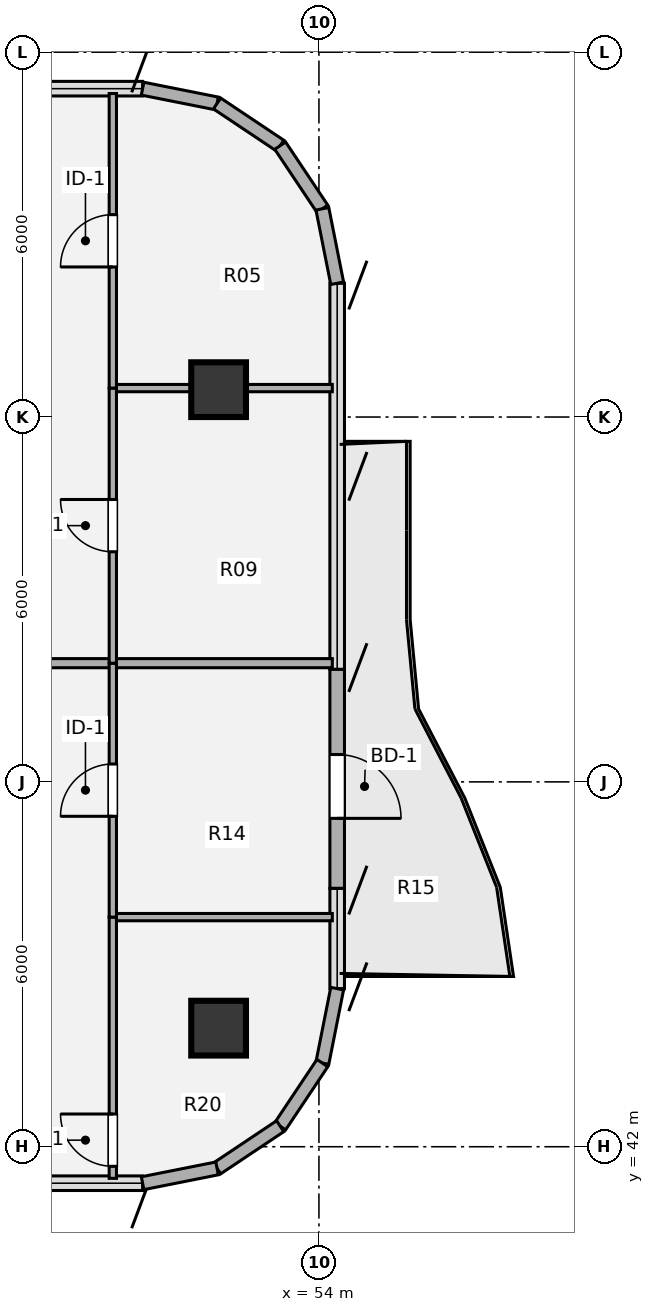
"""IFC4 building model, lengths in metres.
Left out: names, types, materials, properties, quantities, classifications, styles, units other than length and angle.
Written with IfcOpenShell. Run it as: python <this file> out.ifc"""

import sys

from ifc_helpers import new_model, si_unit, direction, frame, frame_2d, origin, origin_2d, place, context, subcontext, project, spatial, rectangle, hollow_circle, extrude, source, transform, mapped, element, fill, save


model = new_model("IFC4")
c1 = context("Model", 3, precision=1e-05, world=origin(), true_north=direction((0.0, 1.0)))
c2 = subcontext(c1, "Body", "Model", "MODEL_VIEW")
j1 = project(units=[si_unit("LENGTHUNIT", "METRE"), si_unit("PLANEANGLEUNIT", "RADIAN")], contexts=[c1])
p1 = place(None, origin())
s1 = spatial("IfcSite", under=j1, at=p1, CompositionType="ELEMENT")
p2 = place(p1, origin())
s2 = spatial("IfcBuilding", under=s1, at=p2, CompositionType="ELEMENT")
p3 = place(p2, frame((0.0, 0.0, 223.02)))
s3 = spatial("IfcBuildingStorey", under=s2, at=p3, CompositionType="ELEMENT", Elevation=223.02)
m1 = source(origin(), c2, "Body", "SweptSolid", [
    extrude(hollow_circle(Radius=0.45, WallThickness=0.032, at=origin_2d()), origin(), (0.0, 0.0, 1.0), 3.78),
])
for number, where, z_axis, x_axis in (
    (1, (52.35, 43.95, 0.0), (0.0, 0.0, 1.0), (1.0, 0.0, 0.0)),
    (2, (52.35, 54.45, 0.0), (0.0, 0.0, 1.0), (1.0, 0.0, 0.0)),
):
    element("IfcColumn", number, at=place(p3, frame(where, z_axis=z_axis, x_axis=x_axis)), inside=s3, PredefinedType="COLUMN", context=c2, shape_type="MappedRepresentation", body=[
        mapped(m1, transform((0.0, 0.0, 0.0), x_axis=(1.0, 0.0, 0.0), y_axis=(0.0, 1.0, 0.0), z_axis=(0.0, 0.0, 1.0), scale=1.0)),
    ])
for number, where, z_axis, x_axis in (
    (3, (51.1, 59.4, 0.0), (0.0, 0.0, 1.0), (0.981, -0.195, 0.0)),
    (4, (52.325, 59.156, 0.0), (0.0, 0.0, 1.0), (0.831, -0.556, 0.0)),
    (5, (53.363, 58.463, 0.0), (0.0, 0.0, 1.0), (0.556, -0.831, 0.0)),
    (6, (54.056, 57.425, 0.0), (0.0, 0.0, 1.0), (0.195, -0.981, 0.0)),
):
    element("IfcWall", number, at=place(p3, frame(where, z_axis=z_axis, x_axis=x_axis)), inside=s3, PredefinedType="SOLIDWALL", context=c2, shape_type="SweptSolid", body=[
        extrude(rectangle(XDim=1.249, YDim=0.215, at=frame_2d((0.624, 0.0))), origin(), (0.0, 0.0, 1.0), 3.53),
    ])
p4 = place(p3, frame((54.3, 49.85, 0.0), z_axis=(0.0, 0.0, 1.0), x_axis=(0.0, -1.0, 0.0)))
e7 = element("IfcWall", 7, at=p4, inside=s3, PredefinedType="SOLIDWALL", context=c2, shape_type="SweptSolid", body=[
    extrude(rectangle(XDim=3.6, YDim=0.24, at=frame_2d((1.8, 0.0))), origin(), (0.0, 0.0, 1.0), 3.53),
])
p5 = place(p4, frame((1.4, 0.0, 0.0)))
e8 = element("IfcOpeningElement", 8, at=p5, cuts=e7, PredefinedType="OPENING", context=c2, shape_type="SweptSolid", body=[
    extrude(rectangle(XDim=1.05, YDim=2.15, at=origin_2d()), frame((0.525, 0.13, 1.075), z_axis=(0.0, -1.0, 0.0), x_axis=(1.0, 0.0, 0.0)), (0.0, 0.0, 1.0), 0.26),
])
for number, where, z_axis, x_axis in (
    (9, (54.3, 44.6, 0.0), (0.0, 0.0, 1.0), (-0.195, -0.981, 0.0)),
    (10, (54.056, 43.375, 0.0), (0.0, 0.0, 1.0), (-0.556, -0.831, 0.0)),
    (11, (53.363, 42.337, 0.0), (0.0, 0.0, 1.0), (-0.831, -0.556, 0.0)),
    (12, (52.325, 41.644, 0.0), (0.0, 0.0, 1.0), (-0.981, -0.195, 0.0)),
):
    element("IfcWall", number, at=place(p3, frame(where, z_axis=z_axis, x_axis=x_axis)), inside=s3, PredefinedType="SOLIDWALL", context=c2, shape_type="SweptSolid", body=[
        extrude(rectangle(XDim=1.249, YDim=0.215, at=frame_2d((0.624, 0.0))), origin(), (0.0, 0.0, 1.0), 3.53),
    ])
p6 = place(p3, frame((50.61, 45.776, 0.0), z_axis=(0.0, 0.0, 1.0), x_axis=(1.0, 0.0, 0.0)))
e13 = element("IfcWall", 13, at=p6, inside=s3, PredefinedType="PARTITIONING", context=c2, shape_type="SweptSolid", body=[
    extrude(rectangle(XDim=3.61, YDim=0.12, at=frame_2d((1.805, 0.0))), origin(), (0.0, 0.0, 1.0), 2.982),
])
p7 = place(p3, frame((38.45, 49.952, 0.0), z_axis=(0.0, 0.0, 1.0), x_axis=(1.0, 0.0, 0.0)))
e14 = element("IfcWall", 14, at=p7, inside=s3, PredefinedType="PARTITIONING", context=c2, shape_type="SweptSolid", body=[
    extrude(rectangle(XDim=15.77, YDim=0.15, at=frame_2d((7.885, 0.0))), origin(), (0.0, 0.0, 1.0), 2.982),
])
p8 = place(p3, frame((50.61, 54.476, 0.0), z_axis=(0.0, 0.0, 1.0), x_axis=(1.0, 0.0, 0.0)))
e15 = element("IfcWall", 15, at=p8, inside=s3, PredefinedType="PARTITIONING", context=c2, shape_type="SweptSolid", body=[
    extrude(rectangle(XDim=3.61, YDim=0.12, at=frame_2d((1.805, 0.0))), origin(), (0.0, 0.0, 1.0), 2.903),
])
p9 = place(p3, frame((50.61, 41.48, 0.0), z_axis=(0.0, 0.0, 1.0), x_axis=(0.0, 1.0, 0.0)))
e16 = element("IfcWall", 16, at=p9, inside=s3, PredefinedType="PARTITIONING", context=c2, shape_type="SweptSolid", body=[
    extrude(rectangle(XDim=4.296, YDim=0.12, at=frame_2d((2.148, 0.0))), origin(), (0.0, 0.0, 1.0), 3.5),
])
p10 = place(p9, frame((0.198, 0.0, 0.0)))
e17 = element("IfcOpeningElement", 17, at=p10, cuts=e16, PredefinedType="OPENING", context=c2, shape_type="SweptSolid", body=[
    extrude(rectangle(XDim=0.86, YDim=2.1, at=origin_2d()), frame((0.43, 0.07, 1.05), z_axis=(0.0, -1.0, 0.0), x_axis=(1.0, 0.0, 0.0)), (0.0, 0.0, 1.0), 0.14),
])
p11 = place(p3, frame((50.61, 45.776, 0.0), z_axis=(0.0, 0.0, 1.0), x_axis=(0.0, 1.0, 0.0)))
e18 = element("IfcWall", 18, at=p11, inside=s3, PredefinedType="PARTITIONING", context=c2, shape_type="SweptSolid", body=[
    extrude(rectangle(XDim=4.176, YDim=0.12, at=frame_2d((2.088, 0.0))), origin(), (0.0, 0.0, 1.0), 3.5),
])
p12 = place(p11, frame((1.658, 0.0, 0.0)))
e19 = element("IfcOpeningElement", 19, at=p12, cuts=e18, PredefinedType="OPENING", context=c2, shape_type="SweptSolid", body=[
    extrude(rectangle(XDim=0.86, YDim=2.1, at=origin_2d()), frame((0.43, 0.07, 1.05), z_axis=(0.0, -1.0, 0.0), x_axis=(1.0, 0.0, 0.0)), (0.0, 0.0, 1.0), 0.14),
])
p13 = place(p3, frame((50.61, 49.952, 0.0), z_axis=(0.0, 0.0, 1.0), x_axis=(0.0, 1.0, 0.0)))
e20 = element("IfcWall", 20, at=p13, inside=s3, PredefinedType="PARTITIONING", context=c2, shape_type="SweptSolid", body=[
    extrude(rectangle(XDim=4.524, YDim=0.12, at=frame_2d((2.262, 0.0))), origin(), (0.0, 0.0, 1.0), 3.5),
])
p14 = place(p13, frame((1.832, 0.0, 0.0)))
e21 = element("IfcOpeningElement", 21, at=p14, cuts=e20, PredefinedType="OPENING", context=c2, shape_type="SweptSolid", body=[
    extrude(rectangle(XDim=0.86, YDim=2.1, at=origin_2d()), frame((0.43, 0.07, 1.05), z_axis=(0.0, -1.0, 0.0), x_axis=(1.0, 0.0, 0.0)), (0.0, 0.0, 1.0), 0.14),
])
p15 = place(p3, frame((50.61, 54.476, 0.0), z_axis=(0.0, 0.0, 1.0), x_axis=(0.0, 1.0, 0.0)))
e22 = element("IfcWall", 22, at=p15, inside=s3, PredefinedType="PARTITIONING", context=c2, shape_type="SweptSolid", body=[
    extrude(rectangle(XDim=4.844, YDim=0.12, at=frame_2d((2.422, 0.0))), origin(), (0.0, 0.0, 1.0), 3.5),
])
p16 = place(p15, frame((1.992, 0.0, 0.0)))
e23 = element("IfcOpeningElement", 23, at=p16, cuts=e22, PredefinedType="OPENING", context=c2, shape_type="SweptSolid", body=[
    extrude(rectangle(XDim=0.86, YDim=2.1, at=origin_2d()), frame((0.43, 0.07, 1.05), z_axis=(0.0, -1.0, 0.0), x_axis=(1.0, 0.0, 0.0)), (0.0, 0.0, 1.0), 0.14),
])
m2 = source(origin(), c2, "Body", "SweptSolid", [
    extrude(rectangle(XDim=1.05, YDim=2.15, at=origin_2d()), frame((0.525, 0.025, 1.075), z_axis=(0.0, -1.0, 0.0), x_axis=(1.0, 0.0, 0.0)), (0.0, 0.0, 1.0), 0.05),
])
p17 = place(p5, origin())
e24 = element("IfcDoor", 24, at=p17, inside=s3, OperationType="SINGLE_SWING_RIGHT", PredefinedType="DOOR", context=c2, shape_type="MappedRepresentation", body=[
    mapped(m2, transform((0.0, 0.0, 0.0), x_axis=(1.0, 0.0, 0.0), y_axis=(0.0, 1.0, 0.0), z_axis=(0.0, 0.0, 1.0), scale=1.0)),
])
fill(e8, e24)
m3 = source(origin(), c2, "Body", "SweptSolid", [
    extrude(rectangle(XDim=0.86, YDim=2.1, at=origin_2d()), frame((0.43, 0.025, 1.05), z_axis=(0.0, -1.0, 0.0), x_axis=(1.0, 0.0, 0.0)), (0.0, 0.0, 1.0), 0.05),
])
p18 = place(p10, origin())
e25 = element("IfcDoor", 25, at=p18, inside=s3, OperationType="SINGLE_SWING_RIGHT", PredefinedType="DOOR", context=c2, shape_type="MappedRepresentation", body=[
    mapped(m3, transform((0.0, 0.0, 0.0), x_axis=(1.0, 0.0, 0.0), y_axis=(0.0, 1.0, 0.0), z_axis=(0.0, 0.0, 1.0), scale=1.0)),
])
fill(e17, e25)
p19 = place(p12, origin())
e26 = element("IfcDoor", 26, at=p19, inside=s3, OperationType="SINGLE_SWING_LEFT", PredefinedType="DOOR", context=c2, shape_type="MappedRepresentation", body=[
    mapped(m3, transform((0.0, 0.0, 0.0), x_axis=(1.0, 0.0, 0.0), y_axis=(0.0, 1.0, 0.0), z_axis=(0.0, 0.0, 1.0), scale=1.0)),
])
fill(e19, e26)
p20 = place(p14, origin())
e27 = element("IfcDoor", 27, at=p20, inside=s3, OperationType="SINGLE_SWING_RIGHT", PredefinedType="DOOR", context=c2, shape_type="MappedRepresentation", body=[
    mapped(m3, transform((0.0, 0.0, 0.0), x_axis=(1.0, 0.0, 0.0), y_axis=(0.0, 1.0, 0.0), z_axis=(0.0, 0.0, 1.0), scale=1.0)),
])
fill(e21, e27)
p21 = place(p16, origin())
e28 = element("IfcDoor", 28, at=p21, inside=s3, OperationType="SINGLE_SWING_LEFT", PredefinedType="DOOR", context=c2, shape_type="MappedRepresentation", body=[
    mapped(m3, transform((0.0, 0.0, 0.0), x_axis=(1.0, 0.0, 0.0), y_axis=(0.0, 1.0, 0.0), z_axis=(0.0, 0.0, 1.0), scale=1.0)),
])
fill(e23, e28)
save(model, sys.argv[1])
